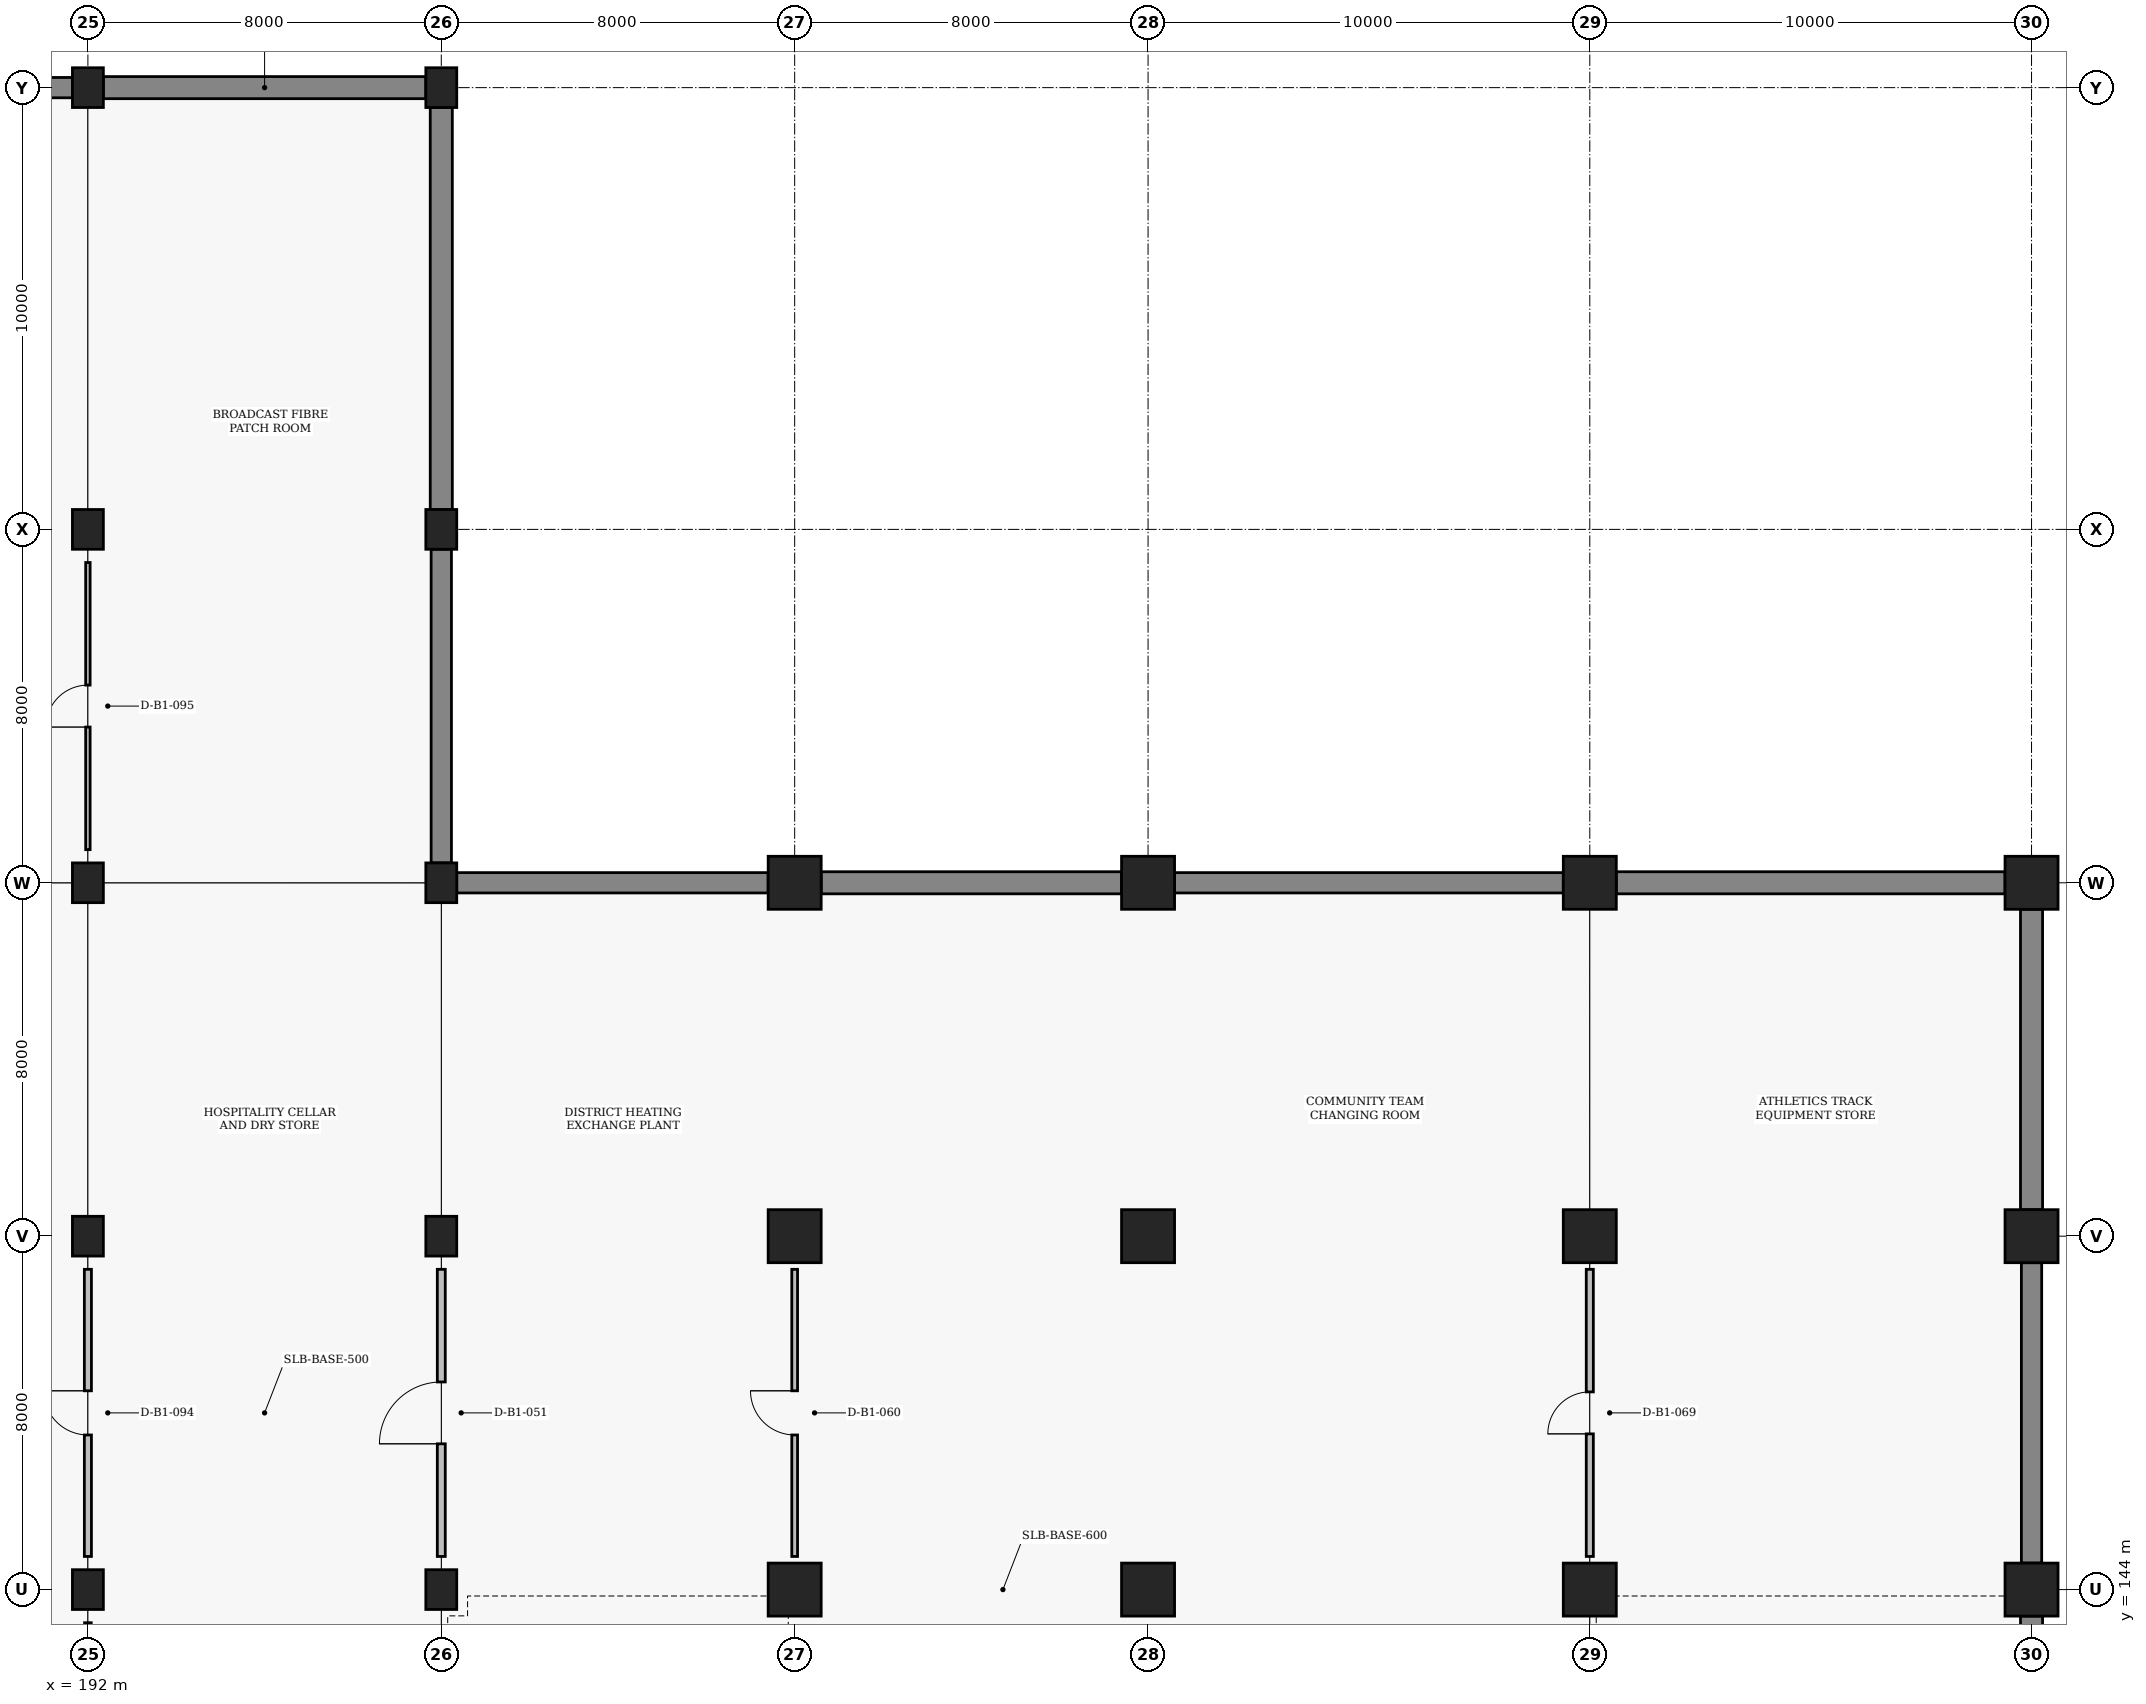
"""IFC4 building model, lengths in metres.
Left out: names, types, materials, properties, quantities, classifications, styles, units other than length and angle.
Written with IfcOpenShell. Run it as: python <this file> out.ifc"""

import sys

from ifc_helpers import new_model, si_unit, direction, frame, frame_2d, origin, origin_2d, place, context, subcontext, project, spatial, rectangle, extrude, element, fill, save


model = new_model("IFC4")
c1 = context("Model", 3, precision=1e-05, world=origin(), true_north=direction((0.0, 1.0)))
c2 = subcontext(c1, "Body", "Model", "MODEL_VIEW")
j1 = project(units=[si_unit("LENGTHUNIT", "METRE"), si_unit("PLANEANGLEUNIT", "RADIAN")], contexts=[c1])
p1 = place(None, origin())
s1 = spatial("IfcSite", under=j1, at=p1, CompositionType="ELEMENT")
p2 = place(p1, origin())
s2 = spatial("IfcBuilding", under=s1, at=p2, CompositionType="ELEMENT")
p3 = place(p2, frame((0.0, 0.0, -5.4)))
s3 = spatial("IfcBuildingStorey", under=s2, at=p3, CompositionType="ELEMENT", Elevation=-5.4)
for number, where, z_axis, x_axis in (
    (1, (192.0, 144.0, 0.0), (0.0, 0.0, 1.0), (1.0, 0.0, 0.0)),
    (2, (192.0, 152.0, 0.0), (0.0, 0.0, 1.0), (1.0, 0.0, 0.0)),
    (3, (192.0, 160.0, 0.0), (0.0, 0.0, 1.0), (1.0, 0.0, 0.0)),
    (4, (192.0, 168.0, 0.0), (0.0, 0.0, 1.0), (1.0, 0.0, 0.0)),
    (5, (192.0, 178.0, 0.0), (0.0, 0.0, 1.0), (1.0, 0.0, 0.0)),
    (6, (200.0, 144.0, 0.0), (0.0, 0.0, 1.0), (1.0, 0.0, 0.0)),
    (7, (200.0, 152.0, 0.0), (0.0, 0.0, 1.0), (1.0, 0.0, 0.0)),
    (8, (200.0, 160.0, 0.0), (0.0, 0.0, 1.0), (1.0, 0.0, 0.0)),
    (9, (200.0, 168.0, 0.0), (0.0, 0.0, 1.0), (1.0, 0.0, 0.0)),
    (10, (200.0, 178.0, 0.0), (0.0, 0.0, 1.0), (1.0, 0.0, 0.0)),
):
    element("IfcColumn", number, at=place(p3, frame(where, z_axis=z_axis, x_axis=x_axis)), inside=s3, PredefinedType="COLUMN", context=c2, shape_type="SweptSolid", body=[
        extrude(rectangle(XDim=0.7, YDim=0.9, at=origin_2d()), origin(), (0.0, 0.0, 1.0), 5.4),
    ])
for number, where, z_axis, x_axis in (
    (11, (208.0, 144.0, 0.0), (0.0, 0.0, 1.0), (1.0, 0.0, 0.0)),
    (12, (208.0, 152.0, 0.0), (0.0, 0.0, 1.0), (1.0, 0.0, 0.0)),
    (13, (208.0, 160.0, 0.0), (0.0, 0.0, 1.0), (1.0, 0.0, 0.0)),
    (14, (216.0, 144.0, 0.0), (0.0, 0.0, 1.0), (1.0, 0.0, 0.0)),
    (15, (216.0, 152.0, 0.0), (0.0, 0.0, 1.0), (1.0, 0.0, 0.0)),
    (16, (216.0, 160.0, 0.0), (0.0, 0.0, 1.0), (1.0, 0.0, 0.0)),
    (17, (226.0, 144.0, 0.0), (0.0, 0.0, 1.0), (1.0, 0.0, 0.0)),
    (18, (226.0, 152.0, 0.0), (0.0, 0.0, 1.0), (1.0, 0.0, 0.0)),
    (19, (226.0, 160.0, 0.0), (0.0, 0.0, 1.0), (1.0, 0.0, 0.0)),
    (20, (236.0, 144.0, 0.0), (0.0, 0.0, 1.0), (1.0, 0.0, 0.0)),
    (21, (236.0, 152.0, 0.0), (0.0, 0.0, 1.0), (1.0, 0.0, 0.0)),
    (22, (236.0, 160.0, 0.0), (0.0, 0.0, 1.0), (1.0, 0.0, 0.0)),
):
    element("IfcColumn", number, at=place(p3, frame(where, z_axis=z_axis, x_axis=x_axis)), inside=s3, PredefinedType="COLUMN", context=c2, shape_type="SweptSolid", body=[
        extrude(rectangle(XDim=1.2, YDim=1.2, at=origin_2d()), origin(), (0.0, 0.0, 1.0), 5.4),
    ])
p4 = place(p3, frame((184.35, 178.0, 0.0), z_axis=(0.0, 0.0, 1.0), x_axis=(1.0, 0.0, 0.0)))
e23 = element("IfcWall", 23, at=p4, inside=s3, PredefinedType="STANDARD", context=c2, shape_type="SweptSolid", body=[
    extrude(rectangle(XDim=7.3, YDim=0.46, at=frame_2d((3.65, 0.0))), origin(), (0.0, 0.0, 1.0), 4.29),
])
p5 = place(p3, frame((200.0, 160.45, 0.0), z_axis=(0.0, 0.0, 1.0), x_axis=(0.0, 1.0, 0.0)))
e24 = element("IfcWall", 24, at=p5, inside=s3, PredefinedType="STANDARD", context=c2, shape_type="SweptSolid", body=[
    extrude(rectangle(XDim=7.1, YDim=0.46, at=frame_2d((3.55, 0.0))), origin(), (0.0, 0.0, 1.0), 4.24),
])
p6 = place(p3, frame((192.35, 178.0, 0.0), z_axis=(0.0, 0.0, 1.0), x_axis=(1.0, 0.0, 0.0)))
e25 = element("IfcWall", 25, at=p6, inside=s3, PredefinedType="STANDARD", context=c2, shape_type="SweptSolid", body=[
    extrude(rectangle(XDim=7.3, YDim=0.5, at=frame_2d((3.65, 0.0))), origin(), (0.0, 0.0, 1.0), 4.24),
])
p7 = place(p3, frame((200.0, 168.45, 0.0), z_axis=(0.0, 0.0, 1.0), x_axis=(0.0, 1.0, 0.0)))
e26 = element("IfcWall", 26, at=p7, inside=s3, PredefinedType="STANDARD", context=c2, shape_type="SweptSolid", body=[
    extrude(rectangle(XDim=9.1, YDim=0.5, at=frame_2d((4.55, 0.0))), origin(), (0.0, 0.0, 1.0), 4.24),
])
p8 = place(p3, frame((200.35, 160.0, 0.0), z_axis=(0.0, 0.0, 1.0), x_axis=(1.0, 0.0, 0.0)))
e27 = element("IfcWall", 27, at=p8, inside=s3, PredefinedType="STANDARD", context=c2, shape_type="SweptSolid", body=[
    extrude(rectangle(XDim=7.05, YDim=0.46, at=frame_2d((3.525, 0.0))), origin(), (0.0, 0.0, 1.0), 4.24),
])
p9 = place(p3, frame((208.6, 160.0, 0.0), z_axis=(0.0, 0.0, 1.0), x_axis=(1.0, 0.0, 0.0)))
e28 = element("IfcWall", 28, at=p9, inside=s3, PredefinedType="STANDARD", context=c2, shape_type="SweptSolid", body=[
    extrude(rectangle(XDim=6.8, YDim=0.5, at=frame_2d((3.4, 0.0))), origin(), (0.0, 0.0, 1.0), 4.34),
])
p10 = place(p3, frame((216.6, 160.0, 0.0), z_axis=(0.0, 0.0, 1.0), x_axis=(1.0, 0.0, 0.0)))
e29 = element("IfcWall", 29, at=p10, inside=s3, PredefinedType="STANDARD", context=c2, shape_type="SweptSolid", body=[
    extrude(rectangle(XDim=8.8, YDim=0.46, at=frame_2d((4.4, 0.0))), origin(), (0.0, 0.0, 1.0), 4.34),
])
p11 = place(p3, frame((236.0, 136.6, 0.0), z_axis=(0.0, 0.0, 1.0), x_axis=(0.0, 1.0, 0.0)))
e30 = element("IfcWall", 30, at=p11, inside=s3, PredefinedType="STANDARD", context=c2, shape_type="SweptSolid", body=[
    extrude(rectangle(XDim=6.8, YDim=0.5, at=frame_2d((3.4, 0.0))), origin(), (0.0, 0.0, 1.0), 4.24),
])
p12 = place(p3, frame((236.0, 144.6, 0.0), z_axis=(0.0, 0.0, 1.0), x_axis=(0.0, 1.0, 0.0)))
e31 = element("IfcWall", 31, at=p12, inside=s3, PredefinedType="STANDARD", context=c2, shape_type="SweptSolid", body=[
    extrude(rectangle(XDim=6.8, YDim=0.46, at=frame_2d((3.4, 0.0))), origin(), (0.0, 0.0, 1.0), 4.24),
])
p13 = place(p3, frame((226.6, 160.0, 0.0), z_axis=(0.0, 0.0, 1.0), x_axis=(1.0, 0.0, 0.0)))
e32 = element("IfcWall", 32, at=p13, inside=s3, PredefinedType="STANDARD", context=c2, shape_type="SweptSolid", body=[
    extrude(rectangle(XDim=8.8, YDim=0.5, at=frame_2d((4.4, 0.0))), origin(), (0.0, 0.0, 1.0), 4.24),
])
p14 = place(p3, frame((236.0, 152.6, 0.0), z_axis=(0.0, 0.0, 1.0), x_axis=(0.0, 1.0, 0.0)))
e33 = element("IfcWall", 33, at=p14, inside=s3, PredefinedType="STANDARD", context=c2, shape_type="SweptSolid", body=[
    extrude(rectangle(XDim=6.8, YDim=0.5, at=frame_2d((3.4, 0.0))), origin(), (0.0, 0.0, 1.0), 4.24),
])
p15 = place(p3, frame((200.0, 144.75, 0.0), z_axis=(0.0, 0.0, 1.0), x_axis=(0.0, 1.0, 0.0)))
e34 = element("IfcWall", 34, at=p15, inside=s3, PredefinedType="PARTITIONING", context=c2, shape_type="SweptSolid", body=[
    extrude(rectangle(XDim=6.5, YDim=0.18, at=frame_2d((3.25, 0.0))), origin(), (0.0, 0.0, 1.0), 3.69),
])
p16 = place(p15, frame((2.55, 0.0, 0.0)))
e35 = element("IfcOpeningElement", 35, at=p16, cuts=e34, PredefinedType="OPENING", context=c2, shape_type="SweptSolid", body=[
    extrude(rectangle(XDim=1.4, YDim=2.2, at=frame_2d((0.7, 1.1))), frame((0.0, 0.1, 0.0), z_axis=(0.0, -1.0, 0.0), x_axis=(1.0, 0.0, 0.0)), (0.0, 0.0, 1.0), 0.2),
])
p17 = place(p3, frame((208.0, 144.75, 0.0), z_axis=(0.0, 0.0, 1.0), x_axis=(0.0, 1.0, 0.0)))
e36 = element("IfcWall", 36, at=p17, inside=s3, PredefinedType="PARTITIONING", context=c2, shape_type="SweptSolid", body=[
    extrude(rectangle(XDim=6.5, YDim=0.13, at=frame_2d((3.25, 0.0))), origin(), (0.0, 0.0, 1.0), 4.39),
])
p18 = place(p17, frame((2.75, 0.0, 0.0)))
e37 = element("IfcOpeningElement", 37, at=p18, cuts=e36, PredefinedType="OPENING", context=c2, shape_type="SweptSolid", body=[
    extrude(rectangle(XDim=1.0, YDim=2.1, at=frame_2d((0.5, 1.05))), frame((0.0, 0.075, 0.0), z_axis=(0.0, -1.0, 0.0), x_axis=(1.0, 0.0, 0.0)), (0.0, 0.0, 1.0), 0.15),
])
p19 = place(p3, frame((226.0, 144.75, 0.0), z_axis=(0.0, 0.0, 1.0), x_axis=(0.0, 1.0, 0.0)))
e38 = element("IfcWall", 38, at=p19, inside=s3, PredefinedType="PARTITIONING", context=c2, shape_type="SweptSolid", body=[
    extrude(rectangle(XDim=6.5, YDim=0.16, at=frame_2d((3.25, 0.0))), origin(), (0.0, 0.0, 1.0), 4.39),
])
p20 = place(p19, frame((2.775, 0.0, 0.0)))
e39 = element("IfcOpeningElement", 39, at=p20, cuts=e38, PredefinedType="OPENING", context=c2, shape_type="SweptSolid", body=[
    extrude(rectangle(XDim=0.95, YDim=2.1, at=frame_2d((0.475, 1.05))), frame((0.0, 0.09, 0.0), z_axis=(0.0, -1.0, 0.0), x_axis=(1.0, 0.0, 0.0)), (0.0, 0.0, 1.0), 0.18),
])
p21 = place(p3, frame((192.0, 136.75, 0.0), z_axis=(0.0, 0.0, 1.0), x_axis=(0.0, 1.0, 0.0)))
e40 = element("IfcWall", 40, at=p21, inside=s3, PredefinedType="PARTITIONING", context=c2, shape_type="SweptSolid", body=[
    extrude(rectangle(XDim=6.5, YDim=0.15, at=frame_2d((3.25, 0.0))), origin(), (0.0, 0.0, 1.0), 3.69),
])
p22 = place(p21, frame((2.725, 0.0, 0.0)))
e41 = element("IfcOpeningElement", 41, at=p22, cuts=e40, PredefinedType="OPENING", context=c2, shape_type="SweptSolid", body=[
    extrude(rectangle(XDim=1.05, YDim=2.15, at=frame_2d((0.525, 1.075))), frame((0.0, 0.085, 0.0), z_axis=(0.0, -1.0, 0.0), x_axis=(1.0, 0.0, 0.0)), (0.0, 0.0, 1.0), 0.17),
])
p23 = place(p3, frame((192.0, 144.75, 0.0), z_axis=(0.0, 0.0, 1.0), x_axis=(0.0, 1.0, 0.0)))
e42 = element("IfcWall", 42, at=p23, inside=s3, PredefinedType="PARTITIONING", context=c2, shape_type="SweptSolid", body=[
    extrude(rectangle(XDim=6.5, YDim=0.16, at=frame_2d((3.25, 0.0))), origin(), (0.0, 0.0, 1.0), 3.69),
])
p24 = place(p23, frame((2.75, 0.0, 0.0)))
e43 = element("IfcOpeningElement", 43, at=p24, cuts=e42, PredefinedType="OPENING", context=c2, shape_type="SweptSolid", body=[
    extrude(rectangle(XDim=1.0, YDim=2.1, at=frame_2d((0.5, 1.05))), frame((0.0, 0.09, 0.0), z_axis=(0.0, -1.0, 0.0), x_axis=(1.0, 0.0, 0.0)), (0.0, 0.0, 1.0), 0.18),
])
p25 = place(p3, frame((192.0, 160.75, 0.0), z_axis=(0.0, 0.0, 1.0), x_axis=(0.0, 1.0, 0.0)))
e44 = element("IfcWall", 44, at=p25, inside=s3, PredefinedType="PARTITIONING", context=c2, shape_type="SweptSolid", body=[
    extrude(rectangle(XDim=6.5, YDim=0.1, at=frame_2d((3.25, 0.0))), origin(), (0.0, 0.0, 1.0), 4.39),
])
p26 = place(p25, frame((2.775, 0.0, 0.0)))
e45 = element("IfcOpeningElement", 45, at=p26, cuts=e44, PredefinedType="OPENING", context=c2, shape_type="SweptSolid", body=[
    extrude(rectangle(XDim=0.95, YDim=2.1, at=frame_2d((0.475, 1.05))), frame((0.0, 0.06, 0.0), z_axis=(0.0, -1.0, 0.0), x_axis=(1.0, 0.0, 0.0)), (0.0, 0.0, 1.0), 0.12),
])
p27 = place(p16, origin())
e46 = element("IfcDoor", 46, at=p27, inside=s3, OperationType="SINGLE_SWING_LEFT", PredefinedType="DOOR", context=c2, shape_type="SweptSolid", body=[
    extrude(rectangle(XDim=1.4, YDim=2.2, at=frame_2d((0.7, 1.1))), frame((0.0, 0.025, 0.0), z_axis=(0.0, -1.0, 0.0), x_axis=(1.0, 0.0, 0.0)), (0.0, 0.0, 1.0), 0.05),
])
fill(e35, e46)
p28 = place(p18, origin())
e47 = element("IfcDoor", 47, at=p28, inside=s3, OperationType="SINGLE_SWING_RIGHT", PredefinedType="DOOR", context=c2, shape_type="SweptSolid", body=[
    extrude(rectangle(XDim=1.0, YDim=2.1, at=frame_2d((0.5, 1.05))), frame((0.0, 0.025, 0.0), z_axis=(0.0, -1.0, 0.0), x_axis=(1.0, 0.0, 0.0)), (0.0, 0.0, 1.0), 0.05),
])
fill(e37, e47)
p29 = place(p20, origin())
e48 = element("IfcDoor", 48, at=p29, inside=s3, OperationType="SINGLE_SWING_LEFT", PredefinedType="DOOR", context=c2, shape_type="SweptSolid", body=[
    extrude(rectangle(XDim=0.95, YDim=2.1, at=frame_2d((0.475, 1.05))), frame((0.0, 0.025, 0.0), z_axis=(0.0, -1.0, 0.0), x_axis=(1.0, 0.0, 0.0)), (0.0, 0.0, 1.0), 0.05),
])
fill(e39, e48)
p30 = place(p24, origin())
e49 = element("IfcDoor", 49, at=p30, inside=s3, OperationType="SINGLE_SWING_RIGHT", PredefinedType="DOOR", context=c2, shape_type="SweptSolid", body=[
    extrude(rectangle(XDim=1.0, YDim=2.1, at=frame_2d((0.5, 1.05))), frame((0.0, 0.025, 0.0), z_axis=(0.0, -1.0, 0.0), x_axis=(1.0, 0.0, 0.0)), (0.0, 0.0, 1.0), 0.05),
])
fill(e43, e49)
p31 = place(p26, origin())
e50 = element("IfcDoor", 50, at=p31, inside=s3, OperationType="SINGLE_SWING_LEFT", PredefinedType="DOOR", context=c2, shape_type="SweptSolid", body=[
    extrude(rectangle(XDim=0.95, YDim=2.1, at=frame_2d((0.475, 1.05))), frame((0.0, 0.025, 0.0), z_axis=(0.0, -1.0, 0.0), x_axis=(1.0, 0.0, 0.0)), (0.0, 0.0, 1.0), 0.05),
])
fill(e45, e50)
save(model, sys.argv[1])
